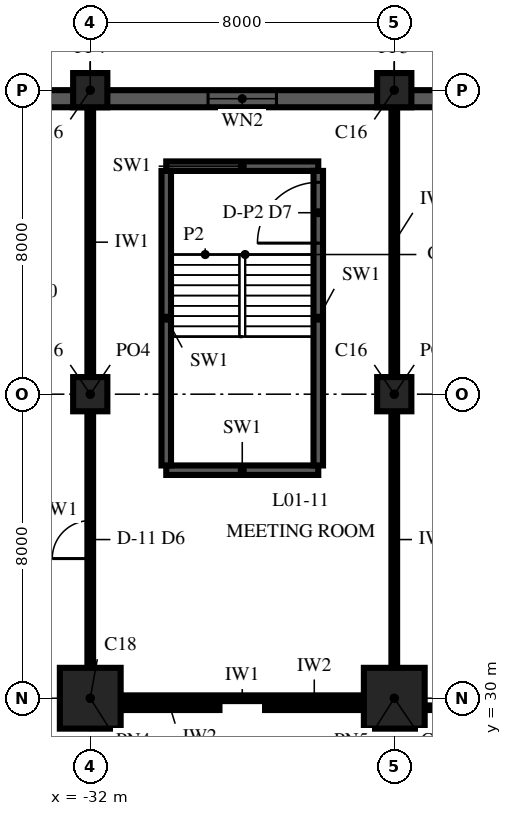
"""IFC4 building model, lengths in metres.
Left out: names, types, materials, properties, quantities, classifications, styles, units other than length and angle.
Written with IfcOpenShell. Run it as: python <this file> out.ifc"""

import sys

from ifc_helpers import new_model, si_unit, direction, frame, frame_2d, origin, origin_2d, place, context, subcontext, project, spatial, rectangle, extrude, element, fill, save


model = new_model("IFC4")
c1 = context("Model", 3, precision=1e-05, world=origin(), true_north=direction((0.0, 1.0)))
c2 = subcontext(c1, "Body", "Model", "MODEL_VIEW")
j1 = project(units=[si_unit("LENGTHUNIT", "METRE"), si_unit("PLANEANGLEUNIT", "RADIAN")], contexts=[c1])
p1 = place(None, origin())
s1 = spatial("IfcSite", under=j1, at=p1, CompositionType="ELEMENT")
p2 = place(p1, origin())
s2 = spatial("IfcBuilding", under=s1, at=p2, CompositionType="ELEMENT")
p3 = place(p2, frame((0.0, 0.0, 6.0)))
s3 = spatial("IfcBuildingStorey", under=s2, at=p3, CompositionType="ELEMENT", Elevation=6.0)
p4 = place(p3, frame((-32.0, 30.0, 0.0), z_axis=(0.0, 0.0, 1.0), x_axis=(1.0, 0.0, 0.0)))
e1 = element("IfcColumn", 1, at=p4, inside=s3, PredefinedType="COLUMN", context=c2, shape_type="SweptSolid", body=[
    extrude(rectangle(XDim=1.6, YDim=1.6, at=origin_2d()), origin(), (0.0, 0.0, 1.0), 6.0),
])
for number, where, z_axis, x_axis in (
    (2, (-32.0, 38.0, 0.0), (0.0, 0.0, 1.0), (1.0, 0.0, 0.0)),
    (3, (-32.0, 46.0, 0.0), (0.0, 0.0, 1.0), (1.0, 0.0, 0.0)),
):
    element("IfcColumn", number, at=place(p3, frame(where, z_axis=z_axis, x_axis=x_axis)), inside=s3, PredefinedType="COLUMN", context=c2, shape_type="SweptSolid", body=[
        extrude(rectangle(XDim=0.9, YDim=0.9, at=origin_2d()), origin(), (0.0, 0.0, 1.0), 6.0),
    ])
p5 = place(p3, frame((-24.0, 30.0, 0.0), z_axis=(0.0, 0.0, 1.0), x_axis=(1.0, 0.0, 0.0)))
e4 = element("IfcColumn", 4, at=p5, inside=s3, PredefinedType="COLUMN", context=c2, shape_type="SweptSolid", body=[
    extrude(rectangle(XDim=1.6, YDim=1.6, at=origin_2d()), origin(), (0.0, 0.0, 1.0), 6.0),
])
for number, where, z_axis, x_axis in (
    (5, (-24.0, 38.0, 0.0), (0.0, 0.0, 1.0), (1.0, 0.0, 0.0)),
    (6, (-24.0, 46.0, 0.0), (0.0, 0.0, 1.0), (1.0, 0.0, 0.0)),
):
    element("IfcColumn", number, at=place(p3, frame(where, z_axis=z_axis, x_axis=x_axis)), inside=s3, PredefinedType="COLUMN", context=c2, shape_type="SweptSolid", body=[
        extrude(rectangle(XDim=0.9, YDim=0.9, at=origin_2d()), origin(), (0.0, 0.0, 1.0), 6.0),
    ])
p6 = place(p3, frame((56.0, 45.775, 0.0), z_axis=(0.0, 0.0, 1.0), x_axis=(-1.0, 0.0, 0.0)))
e7 = element("IfcWall", 7, at=p6, inside=s3, PredefinedType="SOLIDWALL", context=c2, shape_type="SweptSolid", body=[
    extrude(rectangle(XDim=90.0, YDim=0.45, at=frame_2d((45.0, 0.0))), origin(), (0.0, 0.0, 1.0), 6.0),
])
p7 = place(p6, frame((3.1, 0.0, 1.0)))
e8 = element("IfcOpeningElement", 8, at=p7, cuts=e7, PredefinedType="OPENING", context=c2, shape_type="SweptSolid", body=[
    extrude(rectangle(XDim=1.8, YDim=3.0, at=frame_2d((0.9, 1.5))), frame((0.0, 0.24, 0.0), z_axis=(0.0, -1.0, 0.0), x_axis=(1.0, 0.0, 0.0)), (0.0, 0.0, 1.0), 0.48),
])
p8 = place(p6, frame((11.1, 0.0, 1.0)))
e9 = element("IfcOpeningElement", 9, at=p8, cuts=e7, PredefinedType="OPENING", context=c2, shape_type="SweptSolid", body=[
    extrude(rectangle(XDim=1.8, YDim=3.0, at=frame_2d((0.9, 1.5))), frame((0.0, 0.24, 0.0), z_axis=(0.0, -1.0, 0.0), x_axis=(1.0, 0.0, 0.0)), (0.0, 0.0, 1.0), 0.48),
])
p9 = place(p6, frame((19.1, 0.0, 1.0)))
e10 = element("IfcOpeningElement", 10, at=p9, cuts=e7, PredefinedType="OPENING", context=c2, shape_type="SweptSolid", body=[
    extrude(rectangle(XDim=1.8, YDim=3.0, at=frame_2d((0.9, 1.5))), frame((0.0, 0.24, 0.0), z_axis=(0.0, -1.0, 0.0), x_axis=(1.0, 0.0, 0.0)), (0.0, 0.0, 1.0), 0.48),
])
p10 = place(p6, frame((27.1, 0.0, 1.0)))
e11 = element("IfcOpeningElement", 11, at=p10, cuts=e7, PredefinedType="OPENING", context=c2, shape_type="SweptSolid", body=[
    extrude(rectangle(XDim=1.8, YDim=3.0, at=frame_2d((0.9, 1.5))), frame((0.0, 0.24, 0.0), z_axis=(0.0, -1.0, 0.0), x_axis=(1.0, 0.0, 0.0)), (0.0, 0.0, 1.0), 0.48),
])
p11 = place(p6, frame((35.1, 0.0, 1.0)))
e12 = element("IfcOpeningElement", 12, at=p11, cuts=e7, PredefinedType="OPENING", context=c2, shape_type="SweptSolid", body=[
    extrude(rectangle(XDim=1.8, YDim=3.0, at=frame_2d((0.9, 1.5))), frame((0.0, 0.24, 0.0), z_axis=(0.0, -1.0, 0.0), x_axis=(1.0, 0.0, 0.0)), (0.0, 0.0, 1.0), 0.48),
])
p12 = place(p6, frame((43.1, 0.0, 1.0)))
e13 = element("IfcOpeningElement", 13, at=p12, cuts=e7, PredefinedType="OPENING", context=c2, shape_type="SweptSolid", body=[
    extrude(rectangle(XDim=1.8, YDim=3.0, at=frame_2d((0.9, 1.5))), frame((0.0, 0.24, 0.0), z_axis=(0.0, -1.0, 0.0), x_axis=(1.0, 0.0, 0.0)), (0.0, 0.0, 1.0), 0.48),
])
p13 = place(p6, frame((51.1, 0.0, 1.0)))
e14 = element("IfcOpeningElement", 14, at=p13, cuts=e7, PredefinedType="OPENING", context=c2, shape_type="SweptSolid", body=[
    extrude(rectangle(XDim=1.8, YDim=3.0, at=frame_2d((0.9, 1.5))), frame((0.0, 0.24, 0.0), z_axis=(0.0, -1.0, 0.0), x_axis=(1.0, 0.0, 0.0)), (0.0, 0.0, 1.0), 0.48),
])
p14 = place(p6, frame((59.1, 0.0, 1.0)))
e15 = element("IfcOpeningElement", 15, at=p14, cuts=e7, PredefinedType="OPENING", context=c2, shape_type="SweptSolid", body=[
    extrude(rectangle(XDim=1.8, YDim=3.0, at=frame_2d((0.9, 1.5))), frame((0.0, 0.24, 0.0), z_axis=(0.0, -1.0, 0.0), x_axis=(1.0, 0.0, 0.0)), (0.0, 0.0, 1.0), 0.48),
])
p15 = place(p6, frame((67.1, 0.0, 1.0)))
e16 = element("IfcOpeningElement", 16, at=p15, cuts=e7, PredefinedType="OPENING", context=c2, shape_type="SweptSolid", body=[
    extrude(rectangle(XDim=1.8, YDim=3.0, at=frame_2d((0.9, 1.5))), frame((0.0, 0.24, 0.0), z_axis=(0.0, -1.0, 0.0), x_axis=(1.0, 0.0, 0.0)), (0.0, 0.0, 1.0), 0.48),
])
p16 = place(p6, frame((75.1, 0.0, 1.0)))
e17 = element("IfcOpeningElement", 17, at=p16, cuts=e7, PredefinedType="OPENING", context=c2, shape_type="SweptSolid", body=[
    extrude(rectangle(XDim=1.8, YDim=3.0, at=frame_2d((0.9, 1.5))), frame((0.0, 0.24, 0.0), z_axis=(0.0, -1.0, 0.0), x_axis=(1.0, 0.0, 0.0)), (0.0, 0.0, 1.0), 0.48),
])
p17 = place(p6, frame((83.1, 0.0, 1.0)))
e18 = element("IfcOpeningElement", 18, at=p17, cuts=e7, PredefinedType="OPENING", context=c2, shape_type="SweptSolid", body=[
    extrude(rectangle(XDim=1.8, YDim=3.0, at=frame_2d((0.9, 1.5))), frame((0.0, 0.24, 0.0), z_axis=(0.0, -1.0, 0.0), x_axis=(1.0, 0.0, 0.0)), (0.0, 0.0, 1.0), 0.48),
])
for number, where, z_axis, x_axis in (
    (19, (-30.0, 36.0, 0.0), (0.0, 0.0, 1.0), (1.0, 0.0, 0.0)),
    (20, (-26.0, 44.0, 0.0), (0.0, 0.0, 1.0), (-1.0, 0.0, 0.0)),
):
    element("IfcWall", number, at=place(p3, frame(where, z_axis=z_axis, x_axis=x_axis)), inside=s3, PredefinedType="SOLIDWALL", context=c2, shape_type="SweptSolid", body=[
        extrude(rectangle(XDim=4.0, YDim=0.25, at=frame_2d((2.0, 0.0))), origin(), (0.0, 0.0, 1.0), 6.0),
    ])
p18 = place(p3, frame((-26.0, 36.125, 0.0), z_axis=(0.0, 0.0, 1.0), x_axis=(0.0, 1.0, 0.0)))
e21 = element("IfcWall", 21, at=p18, inside=s3, PredefinedType="SOLIDWALL", context=c2, shape_type="SweptSolid", body=[
    extrude(rectangle(XDim=7.75, YDim=0.25, at=frame_2d((3.875, 0.0))), origin(), (0.0, 0.0, 1.0), 6.0),
])
p19 = place(p18, frame((5.85, 0.0, 0.0)))
e22 = element("IfcOpeningElement", 22, at=p19, cuts=e21, PredefinedType="OPENING", context=c2, shape_type="SweptSolid", body=[
    extrude(rectangle(XDim=1.6, YDim=2.1, at=frame_2d((0.8, 1.05))), frame((0.0, 0.14, 0.0), z_axis=(0.0, -1.0, 0.0), x_axis=(1.0, 0.0, 0.0)), (0.0, 0.0, 1.0), 0.28),
])
p20 = place(p3, frame((-30.0, 43.875, 0.0), z_axis=(0.0, 0.0, 1.0), x_axis=(0.0, -1.0, 0.0)))
e23 = element("IfcWall", 23, at=p20, inside=s3, PredefinedType="SOLIDWALL", context=c2, shape_type="SweptSolid", body=[
    extrude(rectangle(XDim=7.75, YDim=0.25, at=frame_2d((3.875, 0.0))), origin(), (0.0, 0.0, 1.0), 6.0),
])
p21 = place(p3, frame((-32.0, 30.81, 0.0), z_axis=(0.0, 0.0, 1.0), x_axis=(0.0, 1.0, 0.0)))
e24 = element("IfcWall", 24, at=p21, inside=s3, PredefinedType="PARTITIONING", context=c2, shape_type="SweptSolid", body=[
    extrude(rectangle(XDim=6.73, YDim=0.15, at=frame_2d((3.365, 0.0))), origin(), (0.0, 0.0, 1.0), 5.05),
])
p22 = place(p21, frame((2.865, 0.0, 0.0)))
e25 = element("IfcOpeningElement", 25, at=p22, cuts=e24, PredefinedType="OPENING", context=c2, shape_type="SweptSolid", body=[
    extrude(rectangle(XDim=1.0, YDim=2.1, at=frame_2d((0.5, 1.05))), frame((0.0, 0.09, 0.0), z_axis=(0.0, -1.0, 0.0), x_axis=(1.0, 0.0, 0.0)), (0.0, 0.0, 1.0), 0.18),
])
p23 = place(p3, frame((-32.0, 38.46, 0.0), z_axis=(0.0, 0.0, 1.0), x_axis=(0.0, 1.0, 0.0)))
e26 = element("IfcWall", 26, at=p23, inside=s3, PredefinedType="PARTITIONING", context=c2, shape_type="SweptSolid", body=[
    extrude(rectangle(XDim=7.08, YDim=0.15, at=frame_2d((3.54, 0.0))), origin(), (0.0, 0.0, 1.0), 5.05),
])
p24 = place(p3, frame((-24.0, 30.81, 0.0), z_axis=(0.0, 0.0, 1.0), x_axis=(0.0, 1.0, 0.0)))
e27 = element("IfcWall", 27, at=p24, inside=s3, PredefinedType="PARTITIONING", context=c2, shape_type="SweptSolid", body=[
    extrude(rectangle(XDim=6.73, YDim=0.15, at=frame_2d((3.365, 0.0))), origin(), (0.0, 0.0, 1.0), 5.05),
])
p25 = place(p3, frame((-24.0, 38.46, 0.0), z_axis=(0.0, 0.0, 1.0), x_axis=(0.0, 1.0, 0.0)))
e28 = element("IfcWall", 28, at=p25, inside=s3, PredefinedType="PARTITIONING", context=c2, shape_type="SweptSolid", body=[
    extrude(rectangle(XDim=7.08, YDim=0.15, at=frame_2d((3.54, 0.0))), origin(), (0.0, 0.0, 1.0), 5.05),
])
for number, where, z_axis, x_axis in (
    (29, (-31.19, 29.75, 0.0), (0.0, 0.0, 1.0), (1.0, 0.0, 0.0)),
    (30, (-27.4, 29.75, 0.0), (0.0, 0.0, 1.0), (1.0, 0.0, 0.0)),
):
    element("IfcWall", number, at=place(p3, frame(where, z_axis=z_axis, x_axis=x_axis)), inside=s3, PredefinedType="PARTITIONING", context=c2, shape_type="SweptSolid", body=[
        extrude(rectangle(XDim=2.59, YDim=0.12, at=frame_2d((1.295, 0.0))), origin(), (0.0, 0.0, 1.0), 5.05),
    ])
p26 = place(p3, frame((-23.19, 29.75, 0.0), z_axis=(0.0, 0.0, 1.0), x_axis=(1.0, 0.0, 0.0)))
e31 = element("IfcWall", 31, at=p26, inside=s3, PredefinedType="PARTITIONING", context=c2, shape_type="SweptSolid", body=[
    extrude(rectangle(XDim=0.677, YDim=0.12, at=frame_2d((0.339, 0.0))), origin(), (0.0, 0.0, 1.0), 5.7),
])
p27 = place(p3, frame((-31.19, 30.0, 0.0), z_axis=(0.0, 0.0, 1.0), x_axis=(1.0, 0.0, 0.0)))
e32 = element("IfcWall", 32, at=p27, inside=s3, PredefinedType="PARTITIONING", context=c2, shape_type="SweptSolid", body=[
    extrude(rectangle(XDim=6.38, YDim=0.15, at=frame_2d((3.19, 0.0))), origin(), (0.0, 0.0, 1.0), 5.05),
])
p28 = place(p17, origin())
e33 = element("IfcWindow", 33, at=p28, inside=s3, PartitioningType="SINGLE_PANEL", PredefinedType="WINDOW", context=c2, shape_type="SweptSolid", body=[
    extrude(rectangle(XDim=1.8, YDim=3.0, at=frame_2d((0.9, 1.5))), frame((0.0, 0.03, 0.0), z_axis=(0.0, -1.0, 0.0), x_axis=(1.0, 0.0, 0.0)), (0.0, 0.0, 1.0), 0.06),
])
fill(e18, e33)
p29 = place(p19, origin())
e34 = element("IfcDoor", 34, at=p29, inside=s3, OperationType="DOUBLE_DOOR_SINGLE_SWING", PredefinedType="DOOR", context=c2, shape_type="SweptSolid", body=[
    extrude(rectangle(XDim=1.6, YDim=2.1, at=frame_2d((0.8, 1.05))), frame((0.0, 0.125, 0.0), z_axis=(0.0, -1.0, 0.0), x_axis=(1.0, 0.0, 0.0)), (0.0, 0.0, 1.0), 0.25),
])
fill(e22, e34)
p30 = place(p22, origin())
e35 = element("IfcDoor", 35, at=p30, inside=s3, OperationType="SINGLE_SWING_LEFT", PredefinedType="DOOR", context=c2, shape_type="SweptSolid", body=[
    extrude(rectangle(XDim=1.0, YDim=2.1, at=frame_2d((0.5, 1.05))), frame((0.0, 0.075, 0.0), z_axis=(0.0, -1.0, 0.0), x_axis=(1.0, 0.0, 0.0)), (0.0, 0.0, 1.0), 0.149),
])
fill(e25, e35)
save(model, sys.argv[1])
